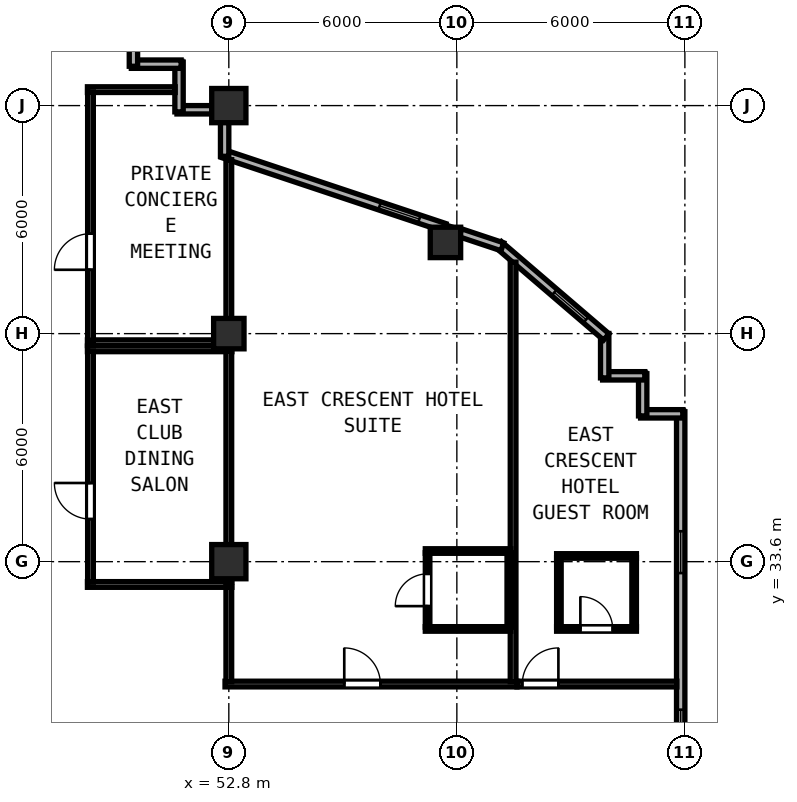
"""IFC4 building model, lengths in metres.
Left out: names, types, materials, properties, quantities, classifications, styles, units other than length and angle.
Written with IfcOpenShell. Run it as: python <this file> out.ifc"""

import sys

from ifc_helpers import new_model, si_unit, direction, frame, frame_2d, origin, origin_2d, place, context, subcontext, project, spatial, rectangle, hollow_rectangle, extrude, element, fill, save


model = new_model("IFC4")
c1 = context("Model", 3, precision=1e-05, world=origin(), true_north=direction((0.0, 1.0)))
c2 = subcontext(c1, "Body", "Model", "MODEL_VIEW")
j1 = project(units=[si_unit("LENGTHUNIT", "METRE"), si_unit("PLANEANGLEUNIT", "RADIAN")], contexts=[c1])
p1 = place(None, origin())
s1 = spatial("IfcSite", under=j1, at=p1, CompositionType="ELEMENT")
p2 = place(p1, origin())
s2 = spatial("IfcBuilding", under=s1, at=p2, CompositionType="ELEMENT")
p3 = place(p2, frame((0.0, 0.0, 176.6)))
s3 = spatial("IfcBuildingStorey", under=s2, at=p3, CompositionType="ELEMENT", Elevation=176.6)
for number, where, z_axis, x_axis in (
    (1, (52.8, 33.6, 0.0), (0.0, 0.0, 1.0), (1.0, 0.0, 0.0)),
    (2, (52.8, 45.6, 0.0), (0.0, 0.0, 1.0), (1.0, 0.0, 0.0)),
):
    element("IfcColumn", number, at=place(p3, frame(where, z_axis=z_axis, x_axis=x_axis)), inside=s3, PredefinedType="COLUMN", context=c2, shape_type="SweptSolid", body=[
        extrude(hollow_rectangle(XDim=0.9, YDim=0.9, WallThickness=0.034, at=origin_2d()), origin(), (0.0, 0.0, 1.0), 3.8),
    ])
for number, where, z_axis, x_axis in (
    (3, (52.8, 39.6, 0.0), (0.0, 0.0, 1.0), (1.0, 0.0, 0.0)),
    (4, (58.5, 42.0, 0.0), (0.0, 0.0, 1.0), (1.0, 0.0, 0.0)),
):
    element("IfcColumn", number, at=place(p3, frame(where, z_axis=z_axis, x_axis=x_axis)), inside=s3, PredefinedType="COLUMN", context=c2, shape_type="SweptSolid", body=[
        extrude(hollow_rectangle(XDim=0.8, YDim=0.8, WallThickness=0.03, at=origin_2d()), origin(), (0.0, 0.0, 1.0), 3.8),
    ])
p4 = place(p3, frame((64.69, 16.4, 0.0), z_axis=(0.0, 0.0, 1.0), x_axis=(0.0, 1.0, 0.0)))
e5 = element("IfcWall", 5, at=p4, inside=s3, PredefinedType="SOLIDWALL", context=c2, shape_type="SweptSolid", body=[
    extrude(rectangle(XDim=21.145, YDim=0.22, at=frame_2d((10.573, 0.0))), origin(), (0.0, 0.0, 1.0), 3.62),
])
p5 = place(p4, frame((1.05, 0.0, 0.85)))
e6 = element("IfcOpeningElement", 6, at=p5, cuts=e5, PredefinedType="OPENING", context=c2, shape_type="SweptSolid", body=[
    extrude(rectangle(XDim=1.1, YDim=1.75, at=frame_2d((0.55, 0.875))), frame((0.0, 0.12, 0.0), z_axis=(0.0, -1.0, 0.0), x_axis=(1.0, 0.0, 0.0)), (0.0, 0.0, 1.0), 0.24),
])
p6 = place(p4, frame((6.1, 0.0, 0.85)))
e7 = element("IfcOpeningElement", 7, at=p6, cuts=e5, PredefinedType="OPENING", context=c2, shape_type="SweptSolid", body=[
    extrude(rectangle(XDim=1.1, YDim=1.75, at=frame_2d((0.55, 0.875))), frame((0.0, 0.12, 0.0), z_axis=(0.0, -1.0, 0.0), x_axis=(1.0, 0.0, 0.0)), (0.0, 0.0, 1.0), 0.24),
])
p7 = place(p4, frame((12.205, 0.0, 0.85)))
e8 = element("IfcOpeningElement", 8, at=p7, cuts=e5, PredefinedType="OPENING", context=c2, shape_type="SweptSolid", body=[
    extrude(rectangle(XDim=1.1, YDim=1.75, at=frame_2d((0.55, 0.875))), frame((0.0, 0.12, 0.0), z_axis=(0.0, -1.0, 0.0), x_axis=(1.0, 0.0, 0.0)), (0.0, 0.0, 1.0), 0.24),
])
p8 = place(p4, frame((16.9, 0.0, 0.85)))
e9 = element("IfcOpeningElement", 9, at=p8, cuts=e5, PredefinedType="OPENING", context=c2, shape_type="SweptSolid", body=[
    extrude(rectangle(XDim=1.1, YDim=1.75, at=frame_2d((0.55, 0.875))), frame((0.0, 0.12, 0.0), z_axis=(0.0, -1.0, 0.0), x_axis=(1.0, 0.0, 0.0)), (0.0, 0.0, 1.0), 0.24),
])
p9 = place(p3, frame((64.745, 37.49, 0.0), z_axis=(0.0, 0.0, 1.0), x_axis=(-1.0, 0.0, 0.0)))
e10 = element("IfcWall", 10, at=p9, inside=s3, PredefinedType="SOLIDWALL", context=c2, shape_type="SweptSolid", body=[
    extrude(rectangle(XDim=1.11, YDim=0.22, at=frame_2d((0.555, 0.0))), origin(), (0.0, 0.0, 1.0), 3.62),
])
p10 = place(p3, frame((63.69, 37.435, 0.0), z_axis=(0.0, 0.0, 1.0), x_axis=(0.0, 1.0, 0.0)))
e11 = element("IfcWall", 11, at=p10, inside=s3, PredefinedType="SOLIDWALL", context=c2, shape_type="SweptSolid", body=[
    extrude(rectangle(XDim=1.11, YDim=0.22, at=frame_2d((0.555, 0.0))), origin(), (0.0, 0.0, 1.0), 3.62),
])
p11 = place(p3, frame((63.745, 38.49, 0.0), z_axis=(0.0, 0.0, 1.0), x_axis=(-1.0, 0.0, 0.0)))
e12 = element("IfcWall", 12, at=p11, inside=s3, PredefinedType="SOLIDWALL", context=c2, shape_type="SweptSolid", body=[
    extrude(rectangle(XDim=1.11, YDim=0.22, at=frame_2d((0.555, 0.0))), origin(), (0.0, 0.0, 1.0), 3.62),
])
p12 = place(p3, frame((62.69, 38.435, 0.0), z_axis=(0.0, 0.0, 1.0), x_axis=(0.0, 1.0, 0.0)))
e13 = element("IfcWall", 13, at=p12, inside=s3, PredefinedType="SOLIDWALL", context=c2, shape_type="SweptSolid", body=[
    extrude(rectangle(XDim=1.169, YDim=0.22, at=frame_2d((0.585, 0.0))), origin(), (0.0, 0.0, 1.0), 3.62),
])
p13 = place(p3, frame((62.732, 39.514, 0.0), z_axis=(0.0, 0.0, 1.0), x_axis=(-0.759251976569, 0.65079677018, 0.0)))
e14 = element("IfcWall", 14, at=p13, inside=s3, PredefinedType="SOLIDWALL", context=c2, shape_type="SweptSolid", body=[
    extrude(rectangle(XDim=3.726, YDim=0.22, at=frame_2d((1.863, 0.0))), origin(), (0.0, 0.0, 1.0), 3.62),
])
p14 = place(p13, frame((0.7, 0.0, 0.85)))
e15 = element("IfcOpeningElement", 15, at=p14, cuts=e14, PredefinedType="OPENING", context=c2, shape_type="SweptSolid", body=[
    extrude(rectangle(XDim=1.1, YDim=1.75, at=frame_2d((0.55, 0.875))), frame((0.0, 0.12, 0.0), z_axis=(0.0, -1.0, 0.0), x_axis=(1.0, 0.0, 0.0)), (0.0, 0.0, 1.0), 0.24),
])
p15 = place(p3, frame((59.997, 41.885, 0.0), z_axis=(0.0, 0.0, 1.0), x_axis=(-0.948662335685, 0.316290646166, 0.0)))
e16 = element("IfcWall", 16, at=p15, inside=s3, PredefinedType="SOLIDWALL", context=c2, shape_type="SweptSolid", body=[
    extrude(rectangle(XDim=1.165, YDim=0.22, at=frame_2d((0.583, 0.0))), origin(), (0.0, 0.0, 1.0), 3.62),
])
p16 = place(p3, frame((58.476, 42.392, 0.0), z_axis=(0.0, 0.0, 1.0), x_axis=(-0.948691231611, 0.316203964339, 0.0)))
e17 = element("IfcWall", 17, at=p16, inside=s3, PredefinedType="SOLIDWALL", context=c2, shape_type="SweptSolid", body=[
    extrude(rectangle(XDim=6.154, YDim=0.22, at=frame_2d((3.077, 0.0))), origin(), (0.0, 0.0, 1.0), 3.215),
])
p17 = place(p16, frame((0.7, 0.0, 0.85)))
e18 = element("IfcOpeningElement", 18, at=p17, cuts=e17, PredefinedType="OPENING", context=c2, shape_type="SweptSolid", body=[
    extrude(rectangle(XDim=1.1, YDim=1.75, at=frame_2d((0.55, 0.875))), frame((0.0, 0.12, 0.0), z_axis=(0.0, -1.0, 0.0), x_axis=(1.0, 0.0, 0.0)), (0.0, 0.0, 1.0), 0.24),
])
p18 = place(p3, frame((52.69, 44.266, 0.0), z_axis=(0.0, 0.0, 1.0), x_axis=(0.0, 1.0, 0.0)))
e19 = element("IfcWall", 19, at=p18, inside=s3, PredefinedType="SOLIDWALL", context=c2, shape_type="SweptSolid", body=[
    extrude(rectangle(XDim=0.892, YDim=0.22, at=frame_2d((0.446, 0.0))), origin(), (0.0, 0.0, 1.0), 3.215),
])
p19 = place(p3, frame((52.358, 45.49, 0.0), z_axis=(0.0, 0.0, 1.0), x_axis=(-1.0, 0.0, 0.0)))
e20 = element("IfcWall", 20, at=p19, inside=s3, PredefinedType="SOLIDWALL", context=c2, shape_type="SweptSolid", body=[
    extrude(rectangle(XDim=0.923, YDim=0.22, at=frame_2d((0.461, 0.0))), origin(), (0.0, 0.0, 1.0), 3.62),
])
p20 = place(p3, frame((51.49, 45.435, 0.0), z_axis=(0.0, 0.0, 1.0), x_axis=(0.0, 1.0, 0.0)))
e21 = element("IfcWall", 21, at=p20, inside=s3, PredefinedType="SOLIDWALL", context=c2, shape_type="SweptSolid", body=[
    extrude(rectangle(XDim=1.31, YDim=0.22, at=frame_2d((0.655, 0.0))), origin(), (0.0, 0.0, 1.0), 3.62),
])
p21 = place(p3, frame((51.545, 46.69, 0.0), z_axis=(0.0, 0.0, 1.0), x_axis=(-1.0, 0.0, 0.0)))
e22 = element("IfcWall", 22, at=p21, inside=s3, PredefinedType="SOLIDWALL", context=c2, shape_type="SweptSolid", body=[
    extrude(rectangle(XDim=1.31, YDim=0.22, at=frame_2d((0.655, 0.0))), origin(), (0.0, 0.0, 1.0), 3.62),
])
p22 = place(p3, frame((50.29, 46.635, 0.0), z_axis=(0.0, 0.0, 1.0), x_axis=(0.0, 1.0, 0.0)))
e23 = element("IfcWall", 23, at=p22, inside=s3, PredefinedType="SOLIDWALL", context=c2, shape_type="SweptSolid", body=[
    extrude(rectangle(XDim=1.535, YDim=0.22, at=frame_2d((0.768, 0.0))), origin(), (0.0, 0.0, 1.0), 3.62),
])
for number, where, z_axis, x_axis in (
    (24, (49.08, 39.2, 0.0), (0.0, 0.0, 1.0), (1.0, 0.0, 0.0)),
    (25, (49.08, 33.0, 0.0), (0.0, 0.0, 1.0), (1.0, 0.0, 0.0)),
):
    element("IfcWall", number, at=place(p3, frame(where, z_axis=z_axis, x_axis=x_axis)), inside=s3, PredefinedType="PARTITIONING", context=c2, shape_type="SweptSolid", body=[
        extrude(rectangle(XDim=3.8, YDim=0.15, at=frame_2d((1.9, 0.0))), origin(), (0.0, 0.0, 1.0), 3.62),
    ])
p23 = place(p3, frame((49.16, 33.06, 0.0), z_axis=(0.0, 0.0, 1.0), x_axis=(0.0, 1.0, 0.0)))
e26 = element("IfcWall", 26, at=p23, inside=s3, PredefinedType="PARTITIONING", context=c2, shape_type="SweptSolid", body=[
    extrude(rectangle(XDim=6.08, YDim=0.15, at=frame_2d((3.04, 0.0))), origin(), (0.0, 0.0, 1.0), 3.62),
])
p24 = place(p23, frame((1.66, 0.0, 0.0)))
e27 = element("IfcOpeningElement", 27, at=p24, cuts=e26, PredefinedType="OPENING", context=c2, shape_type="SweptSolid", body=[
    extrude(rectangle(XDim=0.95, YDim=2.12, at=frame_2d((0.475, 1.06))), frame((0.0, 0.085, 0.0), z_axis=(0.0, -1.0, 0.0), x_axis=(1.0, 0.0, 0.0)), (0.0, 0.0, 1.0), 0.17),
])
p25 = place(p3, frame((52.8, 33.06, 0.0), z_axis=(0.0, 0.0, 1.0), x_axis=(0.0, 1.0, 0.0)))
e28 = element("IfcWall", 28, at=p25, inside=s3, PredefinedType="PARTITIONING", context=c2, shape_type="SweptSolid", body=[
    extrude(rectangle(XDim=6.08, YDim=0.15, at=frame_2d((3.04, 0.0))), origin(), (0.0, 0.0, 1.0), 3.215),
])
p26 = place(p3, frame((49.08, 46.02, 0.0), z_axis=(0.0, 0.0, 1.0), x_axis=(1.0, 0.0, 0.0)))
e29 = element("IfcWall", 29, at=p26, inside=s3, PredefinedType="PARTITIONING", context=c2, shape_type="SweptSolid", body=[
    extrude(rectangle(XDim=2.308, YDim=0.15, at=frame_2d((1.154, 0.0))), origin(), (0.0, 0.0, 1.0), 3.62),
])
p27 = place(p3, frame((49.08, 39.36, 0.0), z_axis=(0.0, 0.0, 1.0), x_axis=(1.0, 0.0, 0.0)))
e30 = element("IfcWall", 30, at=p27, inside=s3, PredefinedType="PARTITIONING", context=c2, shape_type="SweptSolid", body=[
    extrude(rectangle(XDim=3.8, YDim=0.15, at=frame_2d((1.9, 0.0))), origin(), (0.0, 0.0, 1.0), 3.62),
])
p28 = place(p3, frame((49.16, 39.42, 0.0), z_axis=(0.0, 0.0, 1.0), x_axis=(0.0, 1.0, 0.0)))
e31 = element("IfcWall", 31, at=p28, inside=s3, PredefinedType="PARTITIONING", context=c2, shape_type="SweptSolid", body=[
    extrude(rectangle(XDim=6.54, YDim=0.15, at=frame_2d((3.27, 0.0))), origin(), (0.0, 0.0, 1.0), 3.62),
])
p29 = place(p28, frame((1.86, 0.0, 0.0)))
e32 = element("IfcOpeningElement", 32, at=p29, cuts=e31, PredefinedType="OPENING", context=c2, shape_type="SweptSolid", body=[
    extrude(rectangle(XDim=0.95, YDim=2.12, at=frame_2d((0.475, 1.06))), frame((0.0, 0.085, 0.0), z_axis=(0.0, -1.0, 0.0), x_axis=(1.0, 0.0, 0.0)), (0.0, 0.0, 1.0), 0.17),
])
p30 = place(p3, frame((52.8, 39.42, 0.0), z_axis=(0.0, 0.0, 1.0), x_axis=(0.0, 1.0, 0.0)))
e33 = element("IfcWall", 33, at=p30, inside=s3, PredefinedType="PARTITIONING", context=c2, shape_type="SweptSolid", body=[
    extrude(rectangle(XDim=4.757, YDim=0.15, at=frame_2d((2.378, 0.0))), origin(), (0.0, 0.0, 1.0), 3.215),
])
p31 = place(p3, frame((52.7, 30.38, 0.0), z_axis=(0.0, 0.0, 1.0), x_axis=(1.0, 0.0, 0.0)))
e34 = element("IfcWall", 34, at=p31, inside=s3, PredefinedType="PARTITIONING", context=c2, shape_type="SweptSolid", body=[
    extrude(rectangle(XDim=7.68, YDim=0.15, at=frame_2d((3.84, 0.0))), origin(), (0.0, 0.0, 1.0), 3.62),
])
p32 = place(p31, frame((3.137, 0.0, 0.0)))
e35 = element("IfcOpeningElement", 35, at=p32, cuts=e34, PredefinedType="OPENING", context=c2, shape_type="SweptSolid", body=[
    extrude(rectangle(XDim=0.95, YDim=2.18, at=frame_2d((0.475, 1.09))), frame((0.0, 0.085, 0.0), z_axis=(0.0, -1.0, 0.0), x_axis=(1.0, 0.0, 0.0)), (0.0, 0.0, 1.0), 0.17),
])
p33 = place(p3, frame((52.8, 30.44, 0.0), z_axis=(0.0, 0.0, 1.0), x_axis=(0.0, 1.0, 0.0)))
e36 = element("IfcWall", 36, at=p33, inside=s3, PredefinedType="PARTITIONING", context=c2, shape_type="SweptSolid", body=[
    extrude(rectangle(XDim=2.5, YDim=0.15, at=frame_2d((1.25, 0.0))), origin(), (0.0, 0.0, 1.0), 3.215),
])
p34 = place(p3, frame((60.28, 30.44, 0.0), z_axis=(0.0, 0.0, 1.0), x_axis=(0.0, 1.0, 0.0)))
e37 = element("IfcWall", 37, at=p34, inside=s3, PredefinedType="PARTITIONING", context=c2, shape_type="SweptSolid", body=[
    extrude(rectangle(XDim=11.041, YDim=0.15, at=frame_2d((5.521, 0.0))), origin(), (0.0, 0.0, 1.0), 3.62),
])
for number, where, z_axis, x_axis in (
    (38, (57.97, 33.88, 0.0), (0.0, 0.0, 1.0), (1.0, 0.0, 0.0)),
    (39, (57.97, 31.83, 0.0), (0.0, 0.0, 1.0), (1.0, 0.0, 0.0)),
):
    element("IfcWall", number, at=place(p3, frame(where, z_axis=z_axis, x_axis=x_axis)), inside=s3, PredefinedType="PARTITIONING", context=c2, shape_type="SweptSolid", body=[
        extrude(rectangle(XDim=2.25, YDim=0.12, at=frame_2d((1.125, 0.0))), origin(), (0.0, 0.0, 1.0), 3.62),
    ])
p35 = place(p3, frame((58.03, 31.875, 0.0), z_axis=(0.0, 0.0, 1.0), x_axis=(0.0, 1.0, 0.0)))
e40 = element("IfcWall", 40, at=p35, inside=s3, PredefinedType="PARTITIONING", context=c2, shape_type="SweptSolid", body=[
    extrude(rectangle(XDim=1.96, YDim=0.12, at=frame_2d((0.98, 0.0))), origin(), (0.0, 0.0, 1.0), 3.62),
])
p36 = place(p35, frame((1.405, 0.0, 0.0), z_axis=(0.0, 0.0, 1.0), x_axis=(-1.0, 0.0, 0.0)))
e41 = element("IfcOpeningElement", 41, at=p36, cuts=e40, PredefinedType="OPENING", context=c2, shape_type="SweptSolid", body=[
    extrude(rectangle(XDim=0.85, YDim=2.1, at=frame_2d((0.425, 1.05))), frame((0.0, 0.07, 0.0), z_axis=(0.0, -1.0, 0.0), x_axis=(1.0, 0.0, 0.0)), (0.0, 0.0, 1.0), 0.14),
])
p37 = place(p3, frame((60.18, 31.875, 0.0), z_axis=(0.0, 0.0, 1.0), x_axis=(0.0, 1.0, 0.0)))
e42 = element("IfcWall", 42, at=p37, inside=s3, PredefinedType="PARTITIONING", context=c2, shape_type="SweptSolid", body=[
    extrude(rectangle(XDim=1.96, YDim=0.12, at=frame_2d((0.98, 0.0))), origin(), (0.0, 0.0, 1.0), 3.62),
])
p38 = place(p3, frame((60.382, 30.38, 0.0), z_axis=(0.0, 0.0, 1.0), x_axis=(1.0, 0.0, 0.0)))
e43 = element("IfcWall", 43, at=p38, inside=s3, PredefinedType="PARTITIONING", context=c2, shape_type="SweptSolid", body=[
    extrude(rectangle(XDim=4.206, YDim=0.15, at=frame_2d((2.103, 0.0))), origin(), (0.0, 0.0, 1.0), 3.62),
])
p39 = place(p38, frame((0.14, 0.0, 0.0)))
e44 = element("IfcOpeningElement", 44, at=p39, cuts=e43, PredefinedType="OPENING", context=c2, shape_type="SweptSolid", body=[
    extrude(rectangle(XDim=0.95, YDim=2.15, at=frame_2d((0.475, 1.075))), frame((0.0, 0.085, 0.0), z_axis=(0.0, -1.0, 0.0), x_axis=(1.0, 0.0, 0.0)), (0.0, 0.0, 1.0), 0.17),
])
p40 = place(p3, frame((61.425, 33.75, 0.0), z_axis=(0.0, 0.0, 1.0), x_axis=(1.0, 0.0, 0.0)))
e45 = element("IfcWall", 45, at=p40, inside=s3, PredefinedType="PARTITIONING", context=c2, shape_type="SweptSolid", body=[
    extrude(rectangle(XDim=2.1, YDim=0.12, at=frame_2d((1.05, 0.0))), origin(), (0.0, 0.0, 1.0), 3.62),
])
p41 = place(p3, frame((61.425, 31.83, 0.0), z_axis=(0.0, 0.0, 1.0), x_axis=(1.0, 0.0, 0.0)))
e46 = element("IfcWall", 46, at=p41, inside=s3, PredefinedType="PARTITIONING", context=c2, shape_type="SweptSolid", body=[
    extrude(rectangle(XDim=2.1, YDim=0.12, at=frame_2d((1.05, 0.0))), origin(), (0.0, 0.0, 1.0), 3.62),
])
p42 = place(p41, frame((0.625, 0.0, 0.0)))
e47 = element("IfcOpeningElement", 47, at=p42, cuts=e46, PredefinedType="OPENING", context=c2, shape_type="SweptSolid", body=[
    extrude(rectangle(XDim=0.85, YDim=2.1, at=frame_2d((0.425, 1.05))), frame((0.0, 0.07, 0.0), z_axis=(0.0, -1.0, 0.0), x_axis=(1.0, 0.0, 0.0)), (0.0, 0.0, 1.0), 0.14),
])
for number, where, z_axis, x_axis in (
    (48, (61.485, 31.875, 0.0), (0.0, 0.0, 1.0), (0.0, 1.0, 0.0)),
    (49, (63.465, 31.875, 0.0), (0.0, 0.0, 1.0), (0.0, 1.0, 0.0)),
):
    element("IfcWall", number, at=place(p3, frame(where, z_axis=z_axis, x_axis=x_axis)), inside=s3, PredefinedType="PARTITIONING", context=c2, shape_type="SweptSolid", body=[
        extrude(rectangle(XDim=1.83, YDim=0.12, at=frame_2d((0.915, 0.0))), origin(), (0.0, 0.0, 1.0), 3.62),
    ])
p43 = place(p7, origin())
e50 = element("IfcWindow", 50, at=p43, inside=s3, PartitioningType="SINGLE_PANEL", PredefinedType="WINDOW", context=c2, shape_type="SweptSolid", body=[
    extrude(rectangle(XDim=1.1, YDim=1.75, at=frame_2d((0.55, 0.875))), frame((0.0, 0.03, 0.0), z_axis=(0.0, -1.0, 0.0), x_axis=(1.0, 0.0, 0.0)), (0.0, 0.0, 1.0), 0.06),
])
fill(e8, e50)
p44 = place(p8, origin())
e51 = element("IfcWindow", 51, at=p44, inside=s3, PartitioningType="SINGLE_PANEL", PredefinedType="WINDOW", context=c2, shape_type="SweptSolid", body=[
    extrude(rectangle(XDim=1.1, YDim=1.75, at=frame_2d((0.55, 0.875))), frame((0.0, 0.03, 0.0), z_axis=(0.0, -1.0, 0.0), x_axis=(1.0, 0.0, 0.0)), (0.0, 0.0, 1.0), 0.06),
])
fill(e9, e51)
p45 = place(p14, origin())
e52 = element("IfcWindow", 52, at=p45, inside=s3, PartitioningType="SINGLE_PANEL", PredefinedType="WINDOW", context=c2, shape_type="SweptSolid", body=[
    extrude(rectangle(XDim=1.1, YDim=1.75, at=frame_2d((0.55, 0.875))), frame((0.0, 0.03, 0.0), z_axis=(0.0, -1.0, 0.0), x_axis=(1.0, 0.0, 0.0)), (0.0, 0.0, 1.0), 0.06),
])
fill(e15, e52)
p46 = place(p17, origin())
e53 = element("IfcWindow", 53, at=p46, inside=s3, PartitioningType="SINGLE_PANEL", PredefinedType="WINDOW", context=c2, shape_type="SweptSolid", body=[
    extrude(rectangle(XDim=1.1, YDim=1.75, at=frame_2d((0.55, 0.875))), frame((0.0, 0.03, 0.0), z_axis=(0.0, -1.0, 0.0), x_axis=(1.0, 0.0, 0.0)), (0.0, 0.0, 1.0), 0.06),
])
fill(e18, e53)
p47 = place(p24, origin())
e54 = element("IfcDoor", 54, at=p47, inside=s3, OperationType="SINGLE_SWING_RIGHT", PredefinedType="DOOR", context=c2, shape_type="SweptSolid", body=[
    extrude(rectangle(XDim=0.95, YDim=2.12, at=frame_2d((0.475, 1.06))), frame((0.0, 0.025, 0.0), z_axis=(0.0, -1.0, 0.0), x_axis=(1.0, 0.0, 0.0)), (0.0, 0.0, 1.0), 0.05),
])
fill(e27, e54)
p48 = place(p29, origin())
e55 = element("IfcDoor", 55, at=p48, inside=s3, OperationType="SINGLE_SWING_LEFT", PredefinedType="DOOR", context=c2, shape_type="SweptSolid", body=[
    extrude(rectangle(XDim=0.95, YDim=2.12, at=frame_2d((0.475, 1.06))), frame((0.0, 0.025, 0.0), z_axis=(0.0, -1.0, 0.0), x_axis=(1.0, 0.0, 0.0)), (0.0, 0.0, 1.0), 0.05),
])
fill(e32, e55)
p49 = place(p32, origin())
e56 = element("IfcDoor", 56, at=p49, inside=s3, OperationType="SINGLE_SWING_LEFT", PredefinedType="DOOR", context=c2, shape_type="SweptSolid", body=[
    extrude(rectangle(XDim=0.95, YDim=2.18, at=frame_2d((0.475, 1.09))), frame((0.0, 0.025, 0.0), z_axis=(0.0, -1.0, 0.0), x_axis=(1.0, 0.0, 0.0)), (0.0, 0.0, 1.0), 0.05),
])
fill(e35, e56)
p50 = place(p36, origin())
e57 = element("IfcDoor", 57, at=p50, inside=s3, OperationType="SINGLE_SWING_RIGHT", PredefinedType="DOOR", context=c2, shape_type="SweptSolid", body=[
    extrude(rectangle(XDim=0.85, YDim=2.1, at=frame_2d((0.425, 1.05))), frame((0.0, 0.025, 0.0), z_axis=(0.0, -1.0, 0.0), x_axis=(1.0, 0.0, 0.0)), (0.0, 0.0, 1.0), 0.05),
])
fill(e41, e57)
p51 = place(p39, origin())
e58 = element("IfcDoor", 58, at=p51, inside=s3, OperationType="SINGLE_SWING_RIGHT", PredefinedType="DOOR", context=c2, shape_type="SweptSolid", body=[
    extrude(rectangle(XDim=0.95, YDim=2.15, at=frame_2d((0.475, 1.075))), frame((0.0, 0.025, 0.0), z_axis=(0.0, -1.0, 0.0), x_axis=(1.0, 0.0, 0.0)), (0.0, 0.0, 1.0), 0.05),
])
fill(e44, e58)
p52 = place(p42, origin())
e59 = element("IfcDoor", 59, at=p52, inside=s3, OperationType="SINGLE_SWING_LEFT", PredefinedType="DOOR", context=c2, shape_type="SweptSolid", body=[
    extrude(rectangle(XDim=0.85, YDim=2.1, at=frame_2d((0.425, 1.05))), frame((0.0, 0.025, 0.0), z_axis=(0.0, -1.0, 0.0), x_axis=(1.0, 0.0, 0.0)), (0.0, 0.0, 1.0), 0.05),
])
fill(e47, e59)
save(model, sys.argv[1])
